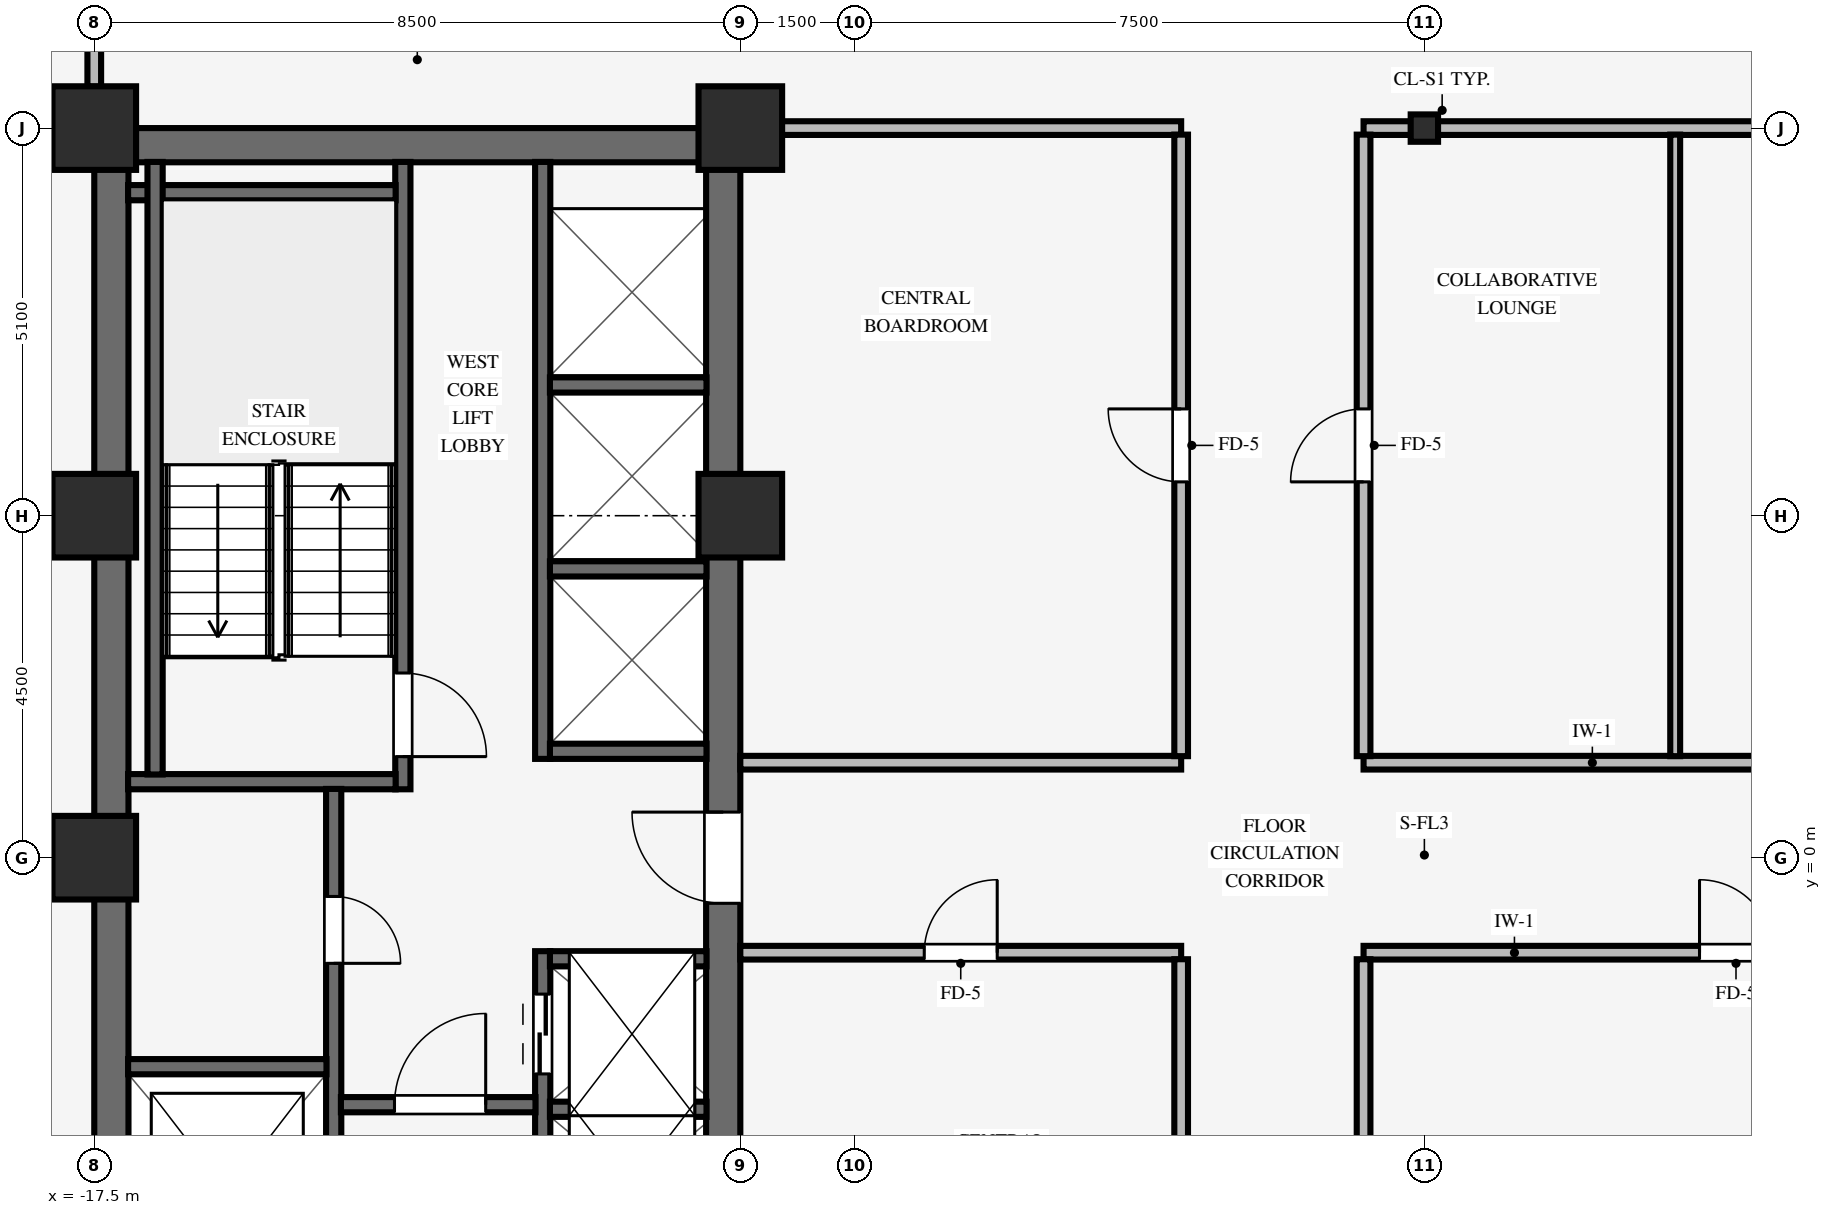
"""IFC4 building model, lengths in metres.
Left out: names, types, materials, properties, quantities, classifications, styles, units other than length and angle.
Written with IfcOpenShell. Run it as: python <this file> out.ifc"""

import sys

from ifc_helpers import new_model, si_unit, direction, frame, frame_2d, origin, origin_2d, place, context, subcontext, project, spatial, rectangle, i_section, extrude, source, transform, mapped, element, fill, save


model = new_model("IFC4")
c1 = context("Model", 3, precision=1e-05, world=origin(), true_north=direction((0.0, 1.0)))
c2 = subcontext(c1, "Body", "Model", "MODEL_VIEW")
j1 = project(units=[si_unit("LENGTHUNIT", "METRE"), si_unit("PLANEANGLEUNIT", "RADIAN")], contexts=[c1])
p1 = place(None, origin())
s1 = spatial("IfcSite", under=j1, at=p1, CompositionType="ELEMENT")
p2 = place(p1, origin())
s2 = spatial("IfcBuilding", under=s1, at=p2, CompositionType="ELEMENT")
p3 = place(p2, frame((0.0, 0.0, 86.0)))
s3 = spatial("IfcBuildingStorey", under=s2, at=p3, CompositionType="ELEMENT", Elevation=86.0)
p4 = place(p3, frame((-17.5, 9.375, 0.0), z_axis=(0.0, 0.0, 1.0), x_axis=(1.0, 0.0, 0.0)))
e1 = element("IfcWall", 1, at=p4, inside=s3, PredefinedType="SHEAR", context=c2, shape_type="SweptSolid", body=[
    extrude(rectangle(XDim=8.5, YDim=0.45, at=frame_2d((4.25, 0.0))), origin(), (0.0, 0.0, 1.0), 3.37),
])
p5 = place(p3, frame((-17.275, -9.155, 0.0), z_axis=(0.0, 0.0, 1.0), x_axis=(0.0, 1.0, 0.0)))
e2 = element("IfcWall", 2, at=p5, inside=s3, PredefinedType="SHEAR", context=c2, shape_type="SweptSolid", body=[
    extrude(rectangle(XDim=18.31, YDim=0.45, at=frame_2d((9.155, 0.0))), origin(), (0.0, 0.0, 1.0), 3.37),
])
p6 = place(p3, frame((-9.225, -9.155, 0.0), z_axis=(0.0, 0.0, 1.0), x_axis=(0.0, 1.0, 0.0)))
e3 = element("IfcWall", 3, at=p6, inside=s3, PredefinedType="SHEAR", context=c2, shape_type="SweptSolid", body=[
    extrude(rectangle(XDim=18.31, YDim=0.45, at=frame_2d((9.155, 0.0))), origin(), (0.0, 0.0, 1.0), 3.37),
])
p7 = place(p6, frame((8.555, 0.0, 0.0)))
e4 = element("IfcOpeningElement", 4, at=p7, cuts=e3, PredefinedType="OPENING", context=c2, shape_type="SweptSolid", body=[
    extrude(rectangle(XDim=1.2, YDim=2.15, at=frame_2d((0.6, 1.075))), frame((0.0, 0.235, 0.0), z_axis=(0.0, -1.0, 0.0), x_axis=(1.0, 0.0, 0.0)), (0.0, 0.0, 1.0), 0.47),
])
for number, where, z_axis, x_axis in (
    (5, (-17.5, 4.5, 0.0), (0.0, 0.0, 1.0), (1.0, 0.0, 0.0)),
    (6, (-17.5, 9.6, 0.0), (0.0, 0.0, 1.0), (1.0, 0.0, 0.0)),
    (7, (-9.0, 4.5, 0.0), (0.0, 0.0, 1.0), (1.0, 0.0, 0.0)),
    (8, (-9.0, 9.6, 0.0), (0.0, 0.0, 1.0), (1.0, 0.0, 0.0)),
    (9, (-17.5, 0.0, 0.0), (0.0, 0.0, 1.0), (1.0, 0.0, 0.0)),
):
    element("IfcColumn", number, at=place(p3, frame(where, z_axis=z_axis, x_axis=x_axis)), inside=s3, PredefinedType="COLUMN", context=c2, shape_type="SweptSolid", body=[
        extrude(rectangle(XDim=1.1, YDim=1.1, at=origin_2d()), origin(), (0.0, 0.0, 1.0), 3.37),
    ])
p8 = place(p3, frame((0.0, 9.6, 0.0), z_axis=(0.0, 0.0, 1.0), x_axis=(1.0, 0.0, 0.0)))
e10 = element("IfcColumn", 10, at=p8, inside=s3, PredefinedType="COLUMN", context=c2, shape_type="SweptSolid", body=[
    extrude(i_section(OverallWidth=0.36, OverallDepth=0.36, WebThickness=0.021, FlangeThickness=0.021, FilletRadius=0.018, at=origin_2d()), origin(), (0.0, 0.0, 1.0), 3.37),
])
p9 = place(p3, frame((-13.44, 0.9, 0.0), z_axis=(0.0, 0.0, 1.0), x_axis=(0.0, 1.0, 0.0)))
e11 = element("IfcWall", 11, at=p9, inside=s3, PredefinedType="SHEAR", context=c2, shape_type="SweptSolid", body=[
    extrude(rectangle(XDim=8.255, YDim=0.2, at=frame_2d((4.127, 0.0))), origin(), (0.0, 0.0, 1.0), 3.37),
])
p10 = place(p9, frame((1.53, 0.0, 0.0), z_axis=(0.0, 0.0, 1.0), x_axis=(-1.0, 0.0, 0.0)))
e12 = element("IfcOpeningElement", 12, at=p10, cuts=e11, PredefinedType="OPENING", context=c2, shape_type="SweptSolid", body=[
    extrude(rectangle(XDim=1.1, YDim=2.15, at=frame_2d((0.55, 1.075))), frame((0.0, 0.11, 0.0), z_axis=(0.0, -1.0, 0.0), x_axis=(1.0, 0.0, 0.0)), (0.0, 0.0, 1.0), 0.22),
])
for number, where, z_axis, x_axis in (
    (13, (-17.055, 1.0, 0.0), (0.0, 0.0, 1.0), (1.0, 0.0, 0.0)),
    (14, (-17.055, 8.75, 0.0), (0.0, 0.0, 1.0), (1.0, 0.0, 0.0)),
):
    element("IfcWall", number, at=place(p3, frame(where, z_axis=z_axis, x_axis=x_axis)), inside=s3, PredefinedType="SHEAR", context=c2, shape_type="SweptSolid", body=[
        extrude(rectangle(XDim=3.52, YDim=0.2, at=frame_2d((1.76, 0.0))), origin(), (0.0, 0.0, 1.0), 3.37),
    ])
p11 = place(p3, frame((-16.7, 1.095, 0.0), z_axis=(0.0, 0.0, 1.0), x_axis=(0.0, 1.0, 0.0)))
e15 = element("IfcWall", 15, at=p11, inside=s3, PredefinedType="SHEAR", context=c2, shape_type="SweptSolid", body=[
    extrude(rectangle(XDim=8.06, YDim=0.2, at=frame_2d((4.03, 0.0))), origin(), (0.0, 0.0, 1.0), 3.37),
])
p12 = place(p3, frame((-14.35, -6.2, 0.0), z_axis=(0.0, 0.0, 1.0), x_axis=(0.0, 1.0, 0.0)))
e16 = element("IfcWall", 16, at=p12, inside=s3, PredefinedType="SHEAR", context=c2, shape_type="SweptSolid", body=[
    extrude(rectangle(XDim=7.105, YDim=0.2, at=frame_2d((3.552, 0.0))), origin(), (0.0, 0.0, 1.0), 3.37),
])
p13 = place(p12, frame((5.69, 0.0, 0.0), z_axis=(0.0, 0.0, 1.0), x_axis=(-1.0, 0.0, 0.0)))
e17 = element("IfcOpeningElement", 17, at=p13, cuts=e16, PredefinedType="OPENING", context=c2, shape_type="SweptSolid", body=[
    extrude(rectangle(XDim=0.88, YDim=2.1, at=frame_2d((0.44, 1.05))), frame((0.0, 0.11, 0.0), z_axis=(0.0, -1.0, 0.0), x_axis=(1.0, 0.0, 0.0)), (0.0, 0.0, 1.0), 0.22),
])
p14 = place(p12, frame((1.15, 0.0, 0.0)))
e18 = element("IfcOpeningElement", 18, at=p14, cuts=e16, PredefinedType="OPENING", context=c2, shape_type="SweptSolid", body=[
    extrude(rectangle(XDim=1.3, YDim=2.2, at=frame_2d((0.65, 1.1))), frame((0.0, 0.11, 0.0), z_axis=(0.0, -1.0, 0.0), x_axis=(1.0, 0.0, 0.0)), (0.0, 0.0, 1.0), 0.22),
])
p15 = place(p3, frame((-17.055, -2.75, 0.0), z_axis=(0.0, 0.0, 1.0), x_axis=(1.0, 0.0, 0.0)))
e19 = element("IfcWall", 19, at=p15, inside=s3, PredefinedType="SHEAR", context=c2, shape_type="SweptSolid", body=[
    extrude(rectangle(XDim=2.61, YDim=0.2, at=frame_2d((1.305, 0.0))), origin(), (0.0, 0.0, 1.0), 3.37),
])
p16 = place(p3, frame((-11.6, -9.155, 0.0), z_axis=(0.0, 0.0, 1.0), x_axis=(0.0, 1.0, 0.0)))
e20 = element("IfcWall", 20, at=p16, inside=s3, PredefinedType="SHEAR", context=c2, shape_type="SweptSolid", body=[
    extrude(rectangle(XDim=7.925, YDim=0.2, at=frame_2d((3.962, 0.0))), origin(), (0.0, 0.0, 1.0), 3.37),
])
p17 = place(p16, frame((0.37, 0.0, 0.0)))
e21 = element("IfcOpeningElement", 21, at=p17, cuts=e20, PredefinedType="OPENING", context=c2, shape_type="SweptSolid", body=[
    extrude(rectangle(XDim=1.05, YDim=2.15, at=frame_2d((0.525, 1.075))), frame((0.0, 0.11, 0.0), z_axis=(0.0, -1.0, 0.0), x_axis=(1.0, 0.0, 0.0)), (0.0, 0.0, 1.0), 0.22),
])
p18 = place(p16, frame((2.35, 0.0, 0.0)))
e22 = element("IfcOpeningElement", 22, at=p18, cuts=e20, PredefinedType="OPENING", context=c2, shape_type="SweptSolid", body=[
    extrude(rectangle(XDim=1.05, YDim=2.15, at=frame_2d((0.525, 1.075))), frame((0.0, 0.11, 0.0), z_axis=(0.0, -1.0, 0.0), x_axis=(1.0, 0.0, 0.0)), (0.0, 0.0, 1.0), 0.22),
])
p19 = place(p16, frame((4.33, 0.0, 0.0)))
e23 = element("IfcOpeningElement", 23, at=p19, cuts=e20, PredefinedType="OPENING", context=c2, shape_type="SweptSolid", body=[
    extrude(rectangle(XDim=1.05, YDim=2.15, at=frame_2d((0.525, 1.075))), frame((0.0, 0.11, 0.0), z_axis=(0.0, -1.0, 0.0), x_axis=(1.0, 0.0, 0.0)), (0.0, 0.0, 1.0), 0.22),
])
p20 = place(p16, frame((6.31, 0.0, 0.0)))
e24 = element("IfcOpeningElement", 24, at=p20, cuts=e20, PredefinedType="OPENING", context=c2, shape_type="SweptSolid", body=[
    extrude(rectangle(XDim=1.05, YDim=2.15, at=frame_2d((0.525, 1.075))), frame((0.0, 0.11, 0.0), z_axis=(0.0, -1.0, 0.0), x_axis=(1.0, 0.0, 0.0)), (0.0, 0.0, 1.0), 0.22),
])
p21 = place(p3, frame((-14.255, -3.25, 0.0), z_axis=(0.0, 0.0, 1.0), x_axis=(1.0, 0.0, 0.0)))
e25 = element("IfcWall", 25, at=p21, inside=s3, PredefinedType="SHEAR", context=c2, shape_type="SweptSolid", body=[
    extrude(rectangle(XDim=2.56, YDim=0.2, at=frame_2d((1.28, 0.0))), origin(), (0.0, 0.0, 1.0), 3.37),
])
p22 = place(p21, frame((0.705, 0.0, 0.0)))
e26 = element("IfcOpeningElement", 26, at=p22, cuts=e25, PredefinedType="OPENING", context=c2, shape_type="SweptSolid", body=[
    extrude(rectangle(XDim=1.2, YDim=2.15, at=frame_2d((0.6, 1.075))), frame((0.0, 0.11, 0.0), z_axis=(0.0, -1.0, 0.0), x_axis=(1.0, 0.0, 0.0)), (0.0, 0.0, 1.0), 0.22),
])
for number, where, z_axis, x_axis in (
    (27, (-11.505, -3.31, 0.0), (0.0, 0.0, 1.0), (1.0, 0.0, 0.0)),
    (28, (-11.505, -1.33, 0.0), (0.0, 0.0, 1.0), (1.0, 0.0, 0.0)),
):
    element("IfcWall", number, at=place(p3, frame(where, z_axis=z_axis, x_axis=x_axis)), inside=s3, PredefinedType="SHEAR", context=c2, shape_type="SweptSolid", body=[
        extrude(rectangle(XDim=2.06, YDim=0.2, at=frame_2d((1.03, 0.0))), origin(), (0.0, 0.0, 1.0), 3.37),
    ])
p23 = place(p3, frame((-11.6, 1.3, 0.0), z_axis=(0.0, 0.0, 1.0), x_axis=(0.0, 1.0, 0.0)))
e29 = element("IfcWall", 29, at=p23, inside=s3, PredefinedType="SHEAR", context=c2, shape_type="SweptSolid", body=[
    extrude(rectangle(XDim=7.855, YDim=0.2, at=frame_2d((3.927, 0.0))), origin(), (0.0, 0.0, 1.0), 3.37),
])
for number, where, z_axis, x_axis in (
    (30, (-11.505, 1.4, 0.0), (0.0, 0.0, 1.0), (1.0, 0.0, 0.0)),
    (31, (-11.505, 3.8, 0.0), (0.0, 0.0, 1.0), (1.0, 0.0, 0.0)),
    (32, (-11.505, 6.22, 0.0), (0.0, 0.0, 1.0), (1.0, 0.0, 0.0)),
):
    element("IfcWall", number, at=place(p3, frame(where, z_axis=z_axis, x_axis=x_axis)), inside=s3, PredefinedType="SHEAR", context=c2, shape_type="SweptSolid", body=[
        extrude(rectangle(XDim=2.06, YDim=0.2, at=frame_2d((1.03, 0.0))), origin(), (0.0, 0.0, 1.0), 3.37),
    ])
p24 = place(p3, frame((-9.0, -1.25, 0.0), z_axis=(0.0, 0.0, 1.0), x_axis=(1.0, 0.0, 0.0)))
e33 = element("IfcWall", 33, at=p24, inside=s3, PredefinedType="PARTITIONING", context=c2, shape_type="SweptSolid", body=[
    extrude(rectangle(XDim=5.8, YDim=0.18, at=frame_2d((2.9, 0.0))), origin(), (0.0, 0.0, 1.0), 3.36),
])
p25 = place(p24, frame((2.42, 0.0, 0.0)))
e34 = element("IfcOpeningElement", 34, at=p25, cuts=e33, PredefinedType="OPENING", context=c2, shape_type="SweptSolid", body=[
    extrude(rectangle(XDim=0.96, YDim=2.1, at=frame_2d((0.48, 1.05))), frame((0.0, 0.1, 0.0), z_axis=(0.0, -1.0, 0.0), x_axis=(1.0, 0.0, 0.0)), (0.0, 0.0, 1.0), 0.2),
])
p26 = place(p3, frame((-0.8, -1.25, 0.0), z_axis=(0.0, 0.0, 1.0), x_axis=(1.0, 0.0, 0.0)))
e35 = element("IfcWall", 35, at=p26, inside=s3, PredefinedType="PARTITIONING", context=c2, shape_type="SweptSolid", body=[
    extrude(rectangle(XDim=9.8, YDim=0.18, at=frame_2d((4.9, 0.0))), origin(), (0.0, 0.0, 1.0), 3.36),
])
p27 = place(p26, frame((4.42, 0.0, 0.0)))
e36 = element("IfcOpeningElement", 36, at=p27, cuts=e35, PredefinedType="OPENING", context=c2, shape_type="SweptSolid", body=[
    extrude(rectangle(XDim=0.96, YDim=2.1, at=frame_2d((0.48, 1.05))), frame((0.0, 0.1, 0.0), z_axis=(0.0, -1.0, 0.0), x_axis=(1.0, 0.0, 0.0)), (0.0, 0.0, 1.0), 0.2),
])
p28 = place(p3, frame((-9.0, 1.25, 0.0), z_axis=(0.0, 0.0, 1.0), x_axis=(1.0, 0.0, 0.0)))
e37 = element("IfcWall", 37, at=p28, inside=s3, PredefinedType="PARTITIONING", context=c2, shape_type="SweptSolid", body=[
    extrude(rectangle(XDim=5.8, YDim=0.18, at=frame_2d((2.9, 0.0))), origin(), (0.0, 0.0, 1.0), 3.36),
])
p29 = place(p3, frame((-0.8, 1.25, 0.0), z_axis=(0.0, 0.0, 1.0), x_axis=(1.0, 0.0, 0.0)))
e38 = element("IfcWall", 38, at=p29, inside=s3, PredefinedType="PARTITIONING", context=c2, shape_type="SweptSolid", body=[
    extrude(rectangle(XDim=9.8, YDim=0.18, at=frame_2d((4.9, 0.0))), origin(), (0.0, 0.0, 1.0), 3.36),
])
p30 = place(p29, frame((6.47, 0.0, 0.0)))
e39 = element("IfcOpeningElement", 39, at=p30, cuts=e38, PredefinedType="OPENING", context=c2, shape_type="SweptSolid", body=[
    extrude(rectangle(XDim=0.96, YDim=2.1, at=frame_2d((0.48, 1.05))), frame((0.0, 0.1, 0.0), z_axis=(0.0, -1.0, 0.0), x_axis=(1.0, 0.0, 0.0)), (0.0, 0.0, 1.0), 0.2),
])
p31 = place(p3, frame((-8.454, 9.6, 0.0), z_axis=(0.0, 0.0, 1.0), x_axis=(1.0, 0.0, 0.0)))
e40 = element("IfcWall", 40, at=p31, inside=s3, PredefinedType="PARTITIONING", context=c2, shape_type="SweptSolid", body=[
    extrude(rectangle(XDim=5.254, YDim=0.18, at=frame_2d((2.627, 0.0))), origin(), (0.0, 0.0, 1.0), 2.405),
])
p32 = place(p3, frame((-0.8, 9.6, 0.0), z_axis=(0.0, 0.0, 1.0), x_axis=(1.0, 0.0, 0.0)))
e41 = element("IfcWall", 41, at=p32, inside=s3, PredefinedType="PARTITIONING", context=c2, shape_type="SweptSolid", body=[
    extrude(rectangle(XDim=0.624, YDim=0.18, at=frame_2d((0.312, 0.0))), origin(), (0.0, 0.0, 1.0), 2.405),
])
p33 = place(p3, frame((0.176, 9.6, 0.0), z_axis=(0.0, 0.0, 1.0), x_axis=(1.0, 0.0, 0.0)))
e42 = element("IfcWall", 42, at=p33, inside=s3, PredefinedType="PARTITIONING", context=c2, shape_type="SweptSolid", body=[
    extrude(rectangle(XDim=8.278, YDim=0.18, at=frame_2d((4.139, 0.0))), origin(), (0.0, 0.0, 1.0), 2.405),
])
p34 = place(p3, frame((-17.5, 10.146, 0.0), z_axis=(0.0, 0.0, 1.0), x_axis=(0.0, 1.0, 0.0)))
e43 = element("IfcWall", 43, at=p34, inside=s3, PredefinedType="PARTITIONING", context=c2, shape_type="SweptSolid", body=[
    extrude(rectangle(XDim=0.968, YDim=0.18, at=frame_2d((0.484, 0.0))), origin(), (0.0, 0.0, 1.0), 2.738),
])
p35 = place(p3, frame((-3.2, -9.514, 0.0), z_axis=(0.0, 0.0, 1.0), x_axis=(0.0, 1.0, 0.0)))
e44 = element("IfcWall", 44, at=p35, inside=s3, PredefinedType="PARTITIONING", context=c2, shape_type="SweptSolid", body=[
    extrude(rectangle(XDim=8.178, YDim=0.18, at=frame_2d((4.089, 0.0))), origin(), (0.0, 0.0, 1.0), 3.36),
])
p36 = place(p3, frame((-3.2, 1.336, 0.0), z_axis=(0.0, 0.0, 1.0), x_axis=(0.0, 1.0, 0.0)))
e45 = element("IfcWall", 45, at=p36, inside=s3, PredefinedType="PARTITIONING", context=c2, shape_type="SweptSolid", body=[
    extrude(rectangle(XDim=8.178, YDim=0.18, at=frame_2d((4.089, 0.0))), origin(), (0.0, 0.0, 1.0), 3.36),
])
p37 = place(p36, frame((3.609, 0.0, 0.0)))
e46 = element("IfcOpeningElement", 46, at=p37, cuts=e45, PredefinedType="OPENING", context=c2, shape_type="SweptSolid", body=[
    extrude(rectangle(XDim=0.96, YDim=2.1, at=frame_2d((0.48, 1.05))), frame((0.0, 0.1, 0.0), z_axis=(0.0, -1.0, 0.0), x_axis=(1.0, 0.0, 0.0)), (0.0, 0.0, 1.0), 0.2),
])
p38 = place(p3, frame((-0.8, -9.514, 0.0), z_axis=(0.0, 0.0, 1.0), x_axis=(0.0, 1.0, 0.0)))
e47 = element("IfcWall", 47, at=p38, inside=s3, PredefinedType="PARTITIONING", context=c2, shape_type="SweptSolid", body=[
    extrude(rectangle(XDim=8.178, YDim=0.18, at=frame_2d((4.089, 0.0))), origin(), (0.0, 0.0, 1.0), 3.36),
])
p39 = place(p3, frame((-0.8, 1.336, 0.0), z_axis=(0.0, 0.0, 1.0), x_axis=(0.0, 1.0, 0.0)))
e48 = element("IfcWall", 48, at=p39, inside=s3, PredefinedType="PARTITIONING", context=c2, shape_type="SweptSolid", body=[
    extrude(rectangle(XDim=8.178, YDim=0.18, at=frame_2d((4.089, 0.0))), origin(), (0.0, 0.0, 1.0), 3.36),
])
p40 = place(p39, frame((3.609, 0.0, 0.0)))
e49 = element("IfcOpeningElement", 49, at=p40, cuts=e48, PredefinedType="OPENING", context=c2, shape_type="SweptSolid", body=[
    extrude(rectangle(XDim=0.96, YDim=2.1, at=frame_2d((0.48, 1.05))), frame((0.0, 0.1, 0.0), z_axis=(0.0, -1.0, 0.0), x_axis=(1.0, 0.0, 0.0)), (0.0, 0.0, 1.0), 0.2),
])
p41 = place(p3, frame((3.3, 1.336, 0.0), z_axis=(0.0, 0.0, 1.0), x_axis=(0.0, 1.0, 0.0)))
e50 = element("IfcWall", 50, at=p41, inside=s3, PredefinedType="PARTITIONING", context=c2, shape_type="SweptSolid", body=[
    extrude(rectangle(XDim=8.178, YDim=0.13, at=frame_2d((4.089, 0.0))), origin(), (0.0, 0.0, 1.0), 3.36),
])
m1 = source(origin(), c2, "Body", "SweptSolid", [
    extrude(rectangle(XDim=1.1, YDim=2.15, at=frame_2d((0.55, 1.075))), frame((0.0, 0.025, 0.0), z_axis=(0.0, -1.0, 0.0), x_axis=(1.0, 0.0, 0.0)), (0.0, 0.0, 1.0), 0.05),
])
p42 = place(p10, origin())
e51 = element("IfcDoor", 51, at=p42, inside=s3, OperationType="SINGLE_SWING_RIGHT", PredefinedType="DOOR", context=c2, shape_type="MappedRepresentation", body=[
    mapped(m1, transform((0.0, 0.0, 0.0), scale=1.0)),
])
fill(e12, e51)
m2 = source(origin(), c2, "Body", "SweptSolid", [
    extrude(rectangle(XDim=0.88, YDim=2.1, at=frame_2d((0.44, 1.05))), frame((0.0, 0.025, 0.0), z_axis=(0.0, -1.0, 0.0), x_axis=(1.0, 0.0, 0.0)), (0.0, 0.0, 1.0), 0.05),
])
p43 = place(p13, origin())
e52 = element("IfcDoor", 52, at=p43, inside=s3, OperationType="SINGLE_SWING_RIGHT", PredefinedType="DOOR", context=c2, shape_type="MappedRepresentation", body=[
    mapped(m2, transform((0.0, 0.0, 0.0), scale=1.0)),
])
fill(e17, e52)
m3 = source(origin(), c2, "Body", "SweptSolid", [
    extrude(rectangle(XDim=1.2, YDim=2.15, at=frame_2d((0.6, 1.075))), frame((0.0, 0.025, 0.0), z_axis=(0.0, -1.0, 0.0), x_axis=(1.0, 0.0, 0.0)), (0.0, 0.0, 1.0), 0.05),
])
p44 = place(p22, origin())
e53 = element("IfcDoor", 53, at=p44, inside=s3, OperationType="SINGLE_SWING_RIGHT", PredefinedType="DOOR", context=c2, shape_type="MappedRepresentation", body=[
    mapped(m3, transform((0.0, 0.0, 0.0), scale=1.0)),
])
fill(e26, e53)
p45 = place(p7, origin())
e54 = element("IfcDoor", 54, at=p45, inside=s3, OperationType="SINGLE_SWING_RIGHT", PredefinedType="DOOR", context=c2, shape_type="MappedRepresentation", body=[
    mapped(m3, transform((0.0, 0.0, 0.0), scale=1.0)),
])
fill(e4, e54)
m4 = source(origin(), c2, "Body", "SweptSolid", [
    extrude(rectangle(XDim=1.05, YDim=2.15, at=frame_2d((0.525, 1.075))), frame((0.0, 0.025, 0.0), z_axis=(0.0, -1.0, 0.0), x_axis=(1.0, 0.0, 0.0)), (0.0, 0.0, 1.0), 0.05),
])
p46 = place(p20, origin())
e55 = element("IfcDoor", 55, at=p46, inside=s3, OperationType="DOUBLE_DOOR_SLIDING", PredefinedType="DOOR", context=c2, shape_type="MappedRepresentation", body=[
    mapped(m4, transform((0.0, 0.0, 0.0), scale=1.0)),
])
fill(e24, e55)
m5 = source(origin(), c2, "Body", "SweptSolid", [
    extrude(rectangle(XDim=0.96, YDim=2.1, at=frame_2d((0.48, 1.05))), frame((0.0, 0.025, 0.0), z_axis=(0.0, -1.0, 0.0), x_axis=(1.0, 0.0, 0.0)), (0.0, 0.0, 1.0), 0.05),
])
p47 = place(p27, origin())
e56 = element("IfcDoor", 56, at=p47, inside=s3, OperationType="SINGLE_SWING_LEFT", PredefinedType="DOOR", context=c2, shape_type="MappedRepresentation", body=[
    mapped(m5, transform((0.0, 0.0, 0.0), scale=1.0)),
])
fill(e36, e56)
p48 = place(p37, origin())
e57 = element("IfcDoor", 57, at=p48, inside=s3, OperationType="SINGLE_SWING_RIGHT", PredefinedType="DOOR", context=c2, shape_type="MappedRepresentation", body=[
    mapped(m5, transform((0.0, 0.0, 0.0), scale=1.0)),
])
fill(e46, e57)
p49 = place(p40, origin())
e58 = element("IfcDoor", 58, at=p49, inside=s3, OperationType="SINGLE_SWING_LEFT", PredefinedType="DOOR", context=c2, shape_type="MappedRepresentation", body=[
    mapped(m5, transform((0.0, 0.0, 0.0), scale=1.0)),
])
fill(e49, e58)
p50 = place(p25, origin())
e59 = element("IfcDoor", 59, at=p50, inside=s3, OperationType="SINGLE_SWING_RIGHT", PredefinedType="DOOR", context=c2, shape_type="MappedRepresentation", body=[
    mapped(m5, transform((0.0, 0.0, 0.0), scale=1.0)),
])
fill(e34, e59)
save(model, sys.argv[1])
